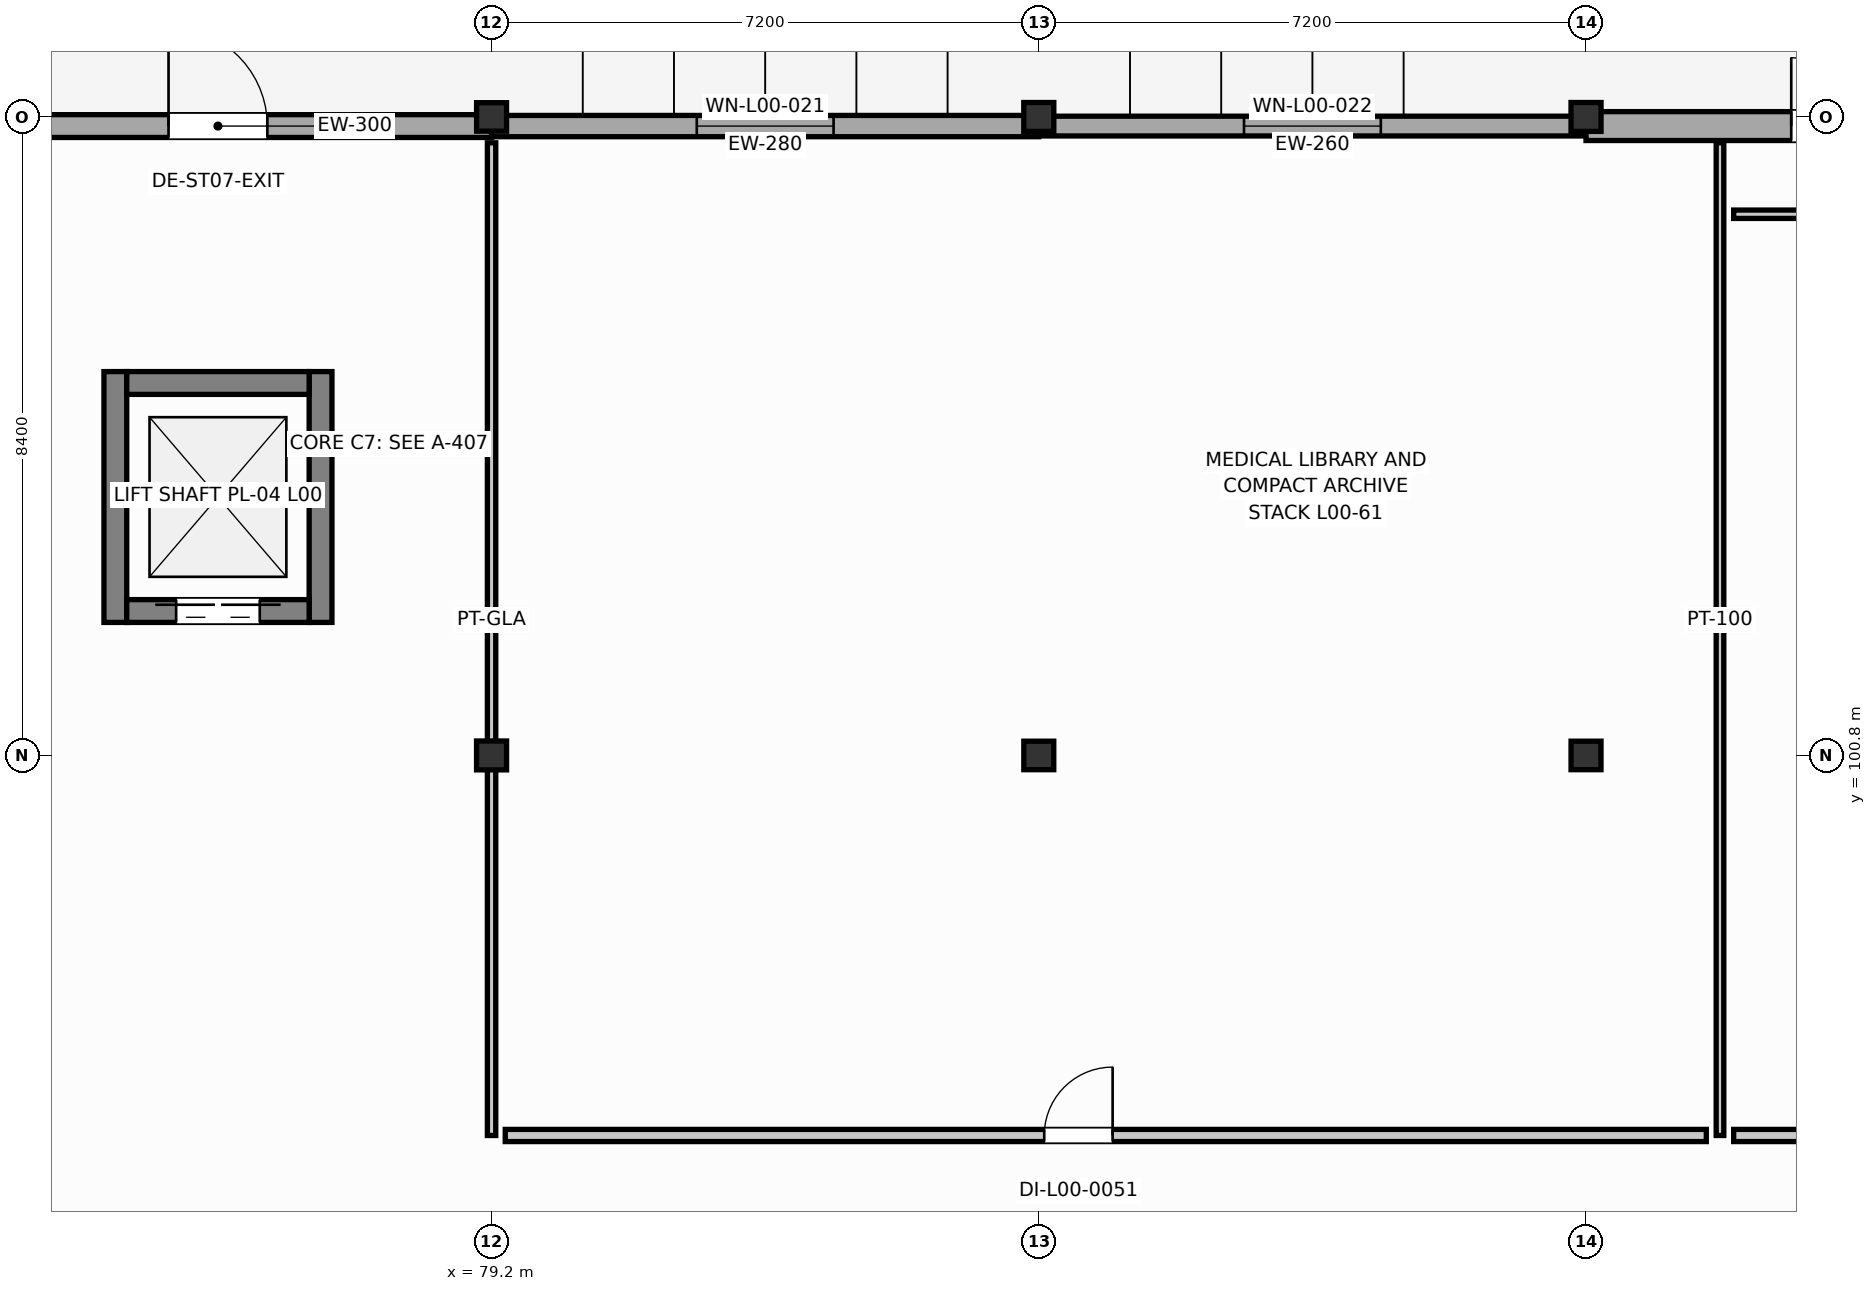
"""IFC4 building model, lengths in metres.
Left out: names, types, materials, properties, quantities, classifications, styles, units other than length and angle.
Written with IfcOpenShell. Run it as: python <this file> out.ifc"""

import sys

from ifc_helpers import new_model, si_unit, direction, frame, frame_2d, origin, origin_2d, place, context, subcontext, project, spatial, rectangle, i_section, extrude, element, fill, save


model = new_model("IFC4")
c1 = context("Model", 3, precision=1e-05, world=origin(), true_north=direction((0.0, 1.0)))
c2 = subcontext(c1, "Body", "Model", "MODEL_VIEW")
j1 = project(units=[si_unit("LENGTHUNIT", "METRE"), si_unit("PLANEANGLEUNIT", "RADIAN")], contexts=[c1])
p1 = place(None, origin())
s1 = spatial("IfcSite", under=j1, at=p1, CompositionType="ELEMENT")
p2 = place(p1, origin())
s2 = spatial("IfcBuilding", under=s1, at=p2, CompositionType="ELEMENT")
p3 = place(p2, origin())
s3 = spatial("IfcBuildingStorey", under=s2, at=p3, CompositionType="ELEMENT", Elevation=0.0)
p4 = place(p3, frame((79.2, 100.8, 0.0), z_axis=(0.0, 0.0, 1.0), x_axis=(1.0, 0.0, 0.0)))
e1 = element("IfcColumn", 1, at=p4, inside=s3, PredefinedType="COLUMN", context=c2, shape_type="SweptSolid", body=[
    extrude(i_section(OverallWidth=0.395, OverallDepth=0.38, WebThickness=0.019, FlangeThickness=0.03, FilletRadius=0.02, at=origin_2d()), origin(), (0.0, 0.0, 1.0), 4.8),
])
for number, where, z_axis, x_axis in (
    (2, (79.2, 109.2, 0.0), (0.0, 0.0, 1.0), (1.0, 0.0, 0.0)),
    (3, (86.4, 100.8, 0.0), (0.0, 0.0, 1.0), (1.0, 0.0, 0.0)),
):
    element("IfcColumn", number, at=place(p3, frame(where, z_axis=z_axis, x_axis=x_axis)), inside=s3, PredefinedType="COLUMN", context=c2, shape_type="SweptSolid", body=[
        extrude(i_section(OverallWidth=0.394, OverallDepth=0.375, WebThickness=0.017, FlangeThickness=0.028, FilletRadius=0.02, at=origin_2d()), origin(), (0.0, 0.0, 1.0), 4.8),
    ])
p5 = place(p3, frame((86.4, 109.2, 0.0), z_axis=(0.0, 0.0, 1.0), x_axis=(1.0, 0.0, 0.0)))
e4 = element("IfcColumn", 4, at=p5, inside=s3, PredefinedType="COLUMN", context=c2, shape_type="SweptSolid", body=[
    extrude(i_section(OverallWidth=0.395, OverallDepth=0.38, WebThickness=0.019, FlangeThickness=0.03, FilletRadius=0.02, at=origin_2d()), origin(), (0.0, 0.0, 1.0), 4.8),
])
p6 = place(p3, frame((93.6, 100.8, 0.0), z_axis=(0.0, 0.0, 1.0), x_axis=(1.0, 0.0, 0.0)))
e5 = element("IfcColumn", 5, at=p6, inside=s3, PredefinedType="COLUMN", context=c2, shape_type="SweptSolid", body=[
    extrude(i_section(OverallWidth=0.394, OverallDepth=0.375, WebThickness=0.017, FlangeThickness=0.028, FilletRadius=0.02, at=origin_2d()), origin(), (0.0, 0.0, 1.0), 4.8),
])
p7 = place(p3, frame((93.6, 109.2, 0.0), z_axis=(0.0, 0.0, 1.0), x_axis=(1.0, 0.0, 0.0)))
e6 = element("IfcColumn", 6, at=p7, inside=s3, PredefinedType="COLUMN", context=c2, shape_type="SweptSolid", body=[
    extrude(i_section(OverallWidth=0.395, OverallDepth=0.38, WebThickness=0.019, FlangeThickness=0.03, FilletRadius=0.02, at=origin_2d()), origin(), (0.0, 0.0, 1.0), 4.8),
])
for number, where, z_axis, x_axis in (
    (7, (74.25, 102.55, 0.0), (0.0, 0.0, 1.0), (0.0, 1.0, 0.0)),
    (8, (76.95, 102.55, 0.0), (0.0, 0.0, 1.0), (0.0, 1.0, 0.0)),
):
    element("IfcWall", number, at=place(p3, frame(where, z_axis=z_axis, x_axis=x_axis)), inside=s3, PredefinedType="SHEAR", context=c2, shape_type="SweptSolid", body=[
        extrude(rectangle(XDim=3.3, YDim=0.3, at=frame_2d((1.65, 0.0))), origin(), (0.0, 0.0, 1.0), 4.57),
    ])
p8 = place(p3, frame((74.4, 105.7, 0.0), z_axis=(0.0, 0.0, 1.0), x_axis=(1.0, 0.0, 0.0)))
e9 = element("IfcWall", 9, at=p8, inside=s3, PredefinedType="SHEAR", context=c2, shape_type="SweptSolid", body=[
    extrude(rectangle(XDim=2.4, YDim=0.3, at=frame_2d((1.2, 0.0))), origin(), (0.0, 0.0, 1.0), 4.57),
])
p9 = place(p3, frame((74.4, 102.7, 0.0), z_axis=(0.0, 0.0, 1.0), x_axis=(1.0, 0.0, 0.0)))
e10 = element("IfcWall", 10, at=p9, inside=s3, PredefinedType="SHEAR", context=c2, shape_type="SweptSolid", body=[
    extrude(rectangle(XDim=2.4, YDim=0.3, at=frame_2d((1.2, 0.0))), origin(), (0.0, 0.0, 1.0), 4.57),
])
p10 = place(p9, frame((0.65, 0.0, 0.0)))
e11 = element("IfcOpeningElement", 11, at=p10, cuts=e10, PredefinedType="OPENING", context=c2, shape_type="SweptSolid", body=[
    extrude(rectangle(XDim=1.1, YDim=2.15, at=frame_2d((0.55, 1.075))), frame((0.0, 0.16, 0.0), z_axis=(0.0, -1.0, 0.0), x_axis=(1.0, 0.0, 0.0)), (0.0, 0.0, 1.0), 0.32),
])
p11 = place(p3, frame((72.0, 109.08, 0.0), z_axis=(0.0, 0.0, 1.0), x_axis=(1.0, 0.0, 0.0)))
e12 = element("IfcWall", 12, at=p11, inside=s3, PredefinedType="SOLIDWALL", context=c2, shape_type="SweptSolid", body=[
    extrude(rectangle(XDim=7.2, YDim=0.3, at=frame_2d((3.6, 0.0))), origin(), (0.0, 0.0, 1.0), 4.082),
])
p12 = place(p11, frame((2.95, 0.0, 0.0)))
e13 = element("IfcOpeningElement", 13, at=p12, cuts=e12, PredefinedType="OPENING", context=c2, shape_type="SweptSolid", body=[
    extrude(rectangle(XDim=1.3, YDim=2.2, at=frame_2d((0.65, 1.1))), frame((0.0, 0.16, 0.0), z_axis=(0.0, -1.0, 0.0), x_axis=(1.0, 0.0, 0.0)), (0.0, 0.0, 1.0), 0.32),
])
p13 = place(p3, frame((79.2, 109.08, 0.0), z_axis=(0.0, 0.0, 1.0), x_axis=(1.0, 0.0, 0.0)))
e14 = element("IfcWall", 14, at=p13, inside=s3, PredefinedType="SOLIDWALL", context=c2, shape_type="SweptSolid", body=[
    extrude(rectangle(XDim=7.2, YDim=0.28, at=frame_2d((3.6, 0.0))), origin(), (0.0, 0.0, 1.0), 4.082),
])
p14 = place(p13, frame((2.7, 0.0, 0.95)))
e15 = element("IfcOpeningElement", 15, at=p14, cuts=e14, PredefinedType="OPENING", context=c2, shape_type="SweptSolid", body=[
    extrude(rectangle(XDim=1.8, YDim=1.15, at=frame_2d((0.9, 0.575))), frame((0.0, 0.15, 0.0), z_axis=(0.0, -1.0, 0.0), x_axis=(1.0, 0.0, 0.0)), (0.0, 0.0, 1.0), 0.3),
])
p15 = place(p3, frame((86.4, 109.08, 0.0), z_axis=(0.0, 0.0, 1.0), x_axis=(1.0, 0.0, 0.0)))
e16 = element("IfcWall", 16, at=p15, inside=s3, PredefinedType="SOLIDWALL", context=c2, shape_type="SweptSolid", body=[
    extrude(rectangle(XDim=7.2, YDim=0.26, at=frame_2d((3.6, 0.0))), origin(), (0.0, 0.0, 1.0), 4.082),
])
p16 = place(p15, frame((2.7, 0.0, 0.95)))
e17 = element("IfcOpeningElement", 17, at=p16, cuts=e16, PredefinedType="OPENING", context=c2, shape_type="SweptSolid", body=[
    extrude(rectangle(XDim=1.8, YDim=1.35, at=frame_2d((0.9, 0.675))), frame((0.0, 0.14, 0.0), z_axis=(0.0, -1.0, 0.0), x_axis=(1.0, 0.0, 0.0)), (0.0, 0.0, 1.0), 0.28),
])
p17 = place(p3, frame((93.6, 109.08, 0.0), z_axis=(0.0, 0.0, 1.0), x_axis=(1.0, 0.0, 0.0)))
e18 = element("IfcWall", 18, at=p17, inside=s3, PredefinedType="SOLIDWALL", context=c2, shape_type="SweptSolid", body=[
    extrude(rectangle(XDim=7.2, YDim=0.38, at=frame_2d((3.6, 0.0))), origin(), (0.0, 0.0, 1.0), 4.082),
])
p18 = place(p17, frame((2.7, 0.0, 0.0)))
e19 = element("IfcOpeningElement", 19, at=p18, cuts=e18, PredefinedType="OPENING", context=c2, shape_type="SweptSolid", body=[
    extrude(rectangle(XDim=1.8, YDim=2.2, at=frame_2d((0.9, 1.1))), frame((0.0, 0.2, 0.0), z_axis=(0.0, -1.0, 0.0), x_axis=(1.0, 0.0, 0.0)), (0.0, 0.0, 1.0), 0.4),
])
p19 = place(p3, frame((79.2, 95.8, 0.0), z_axis=(0.0, 0.0, 1.0), x_axis=(0.0, 1.0, 0.0)))
e20 = element("IfcWall", 20, at=p19, inside=s3, PredefinedType="MOVABLE", context=c2, shape_type="SweptSolid", body=[
    extrude(rectangle(XDim=13.06, YDim=0.11, at=frame_2d((6.53, 0.0))), origin(), (0.0, 0.0, 1.0), 3.694),
])
p20 = place(p3, frame((95.363, 108.86, 0.0), z_axis=(0.0, 0.0, 1.0), x_axis=(0.0, -1.0, 0.0)))
e21 = element("IfcWall", 21, at=p20, inside=s3, PredefinedType="PARTITIONING", context=c2, shape_type="SweptSolid", body=[
    extrude(rectangle(XDim=13.06, YDim=0.1, at=frame_2d((6.53, 0.0))), origin(), (0.0, 0.0, 1.0), 4.132),
])
p21 = place(p3, frame((95.183, 95.8, 0.0), z_axis=(0.0, 0.0, 1.0), x_axis=(-1.0, 0.0, 0.0)))
e22 = element("IfcWall", 22, at=p21, inside=s3, PredefinedType="PARTITIONING", context=c2, shape_type="SweptSolid", body=[
    extrude(rectangle(XDim=15.803, YDim=0.16, at=frame_2d((7.901, 0.0))), origin(), (0.0, 0.0, 1.0), 4.008),
])
p22 = place(p21, frame((7.811, 0.0, 0.0)))
e23 = element("IfcOpeningElement", 23, at=p22, cuts=e22, PredefinedType="OPENING", context=c2, shape_type="SweptSolid", body=[
    extrude(rectangle(XDim=0.9, YDim=2.04, at=frame_2d((0.45, 1.02))), frame((0.0, 0.09, 0.0), z_axis=(0.0, -1.0, 0.0), x_axis=(1.0, 0.0, 0.0)), (0.0, 0.0, 1.0), 0.18),
])
p23 = place(p3, frame((111.345, 95.8, 0.0), z_axis=(0.0, 0.0, 1.0), x_axis=(-1.0, 0.0, 0.0)))
e24 = element("IfcWall", 24, at=p23, inside=s3, PredefinedType="PARTITIONING", context=c2, shape_type="SweptSolid", body=[
    extrude(rectangle(XDim=15.802, YDim=0.16, at=frame_2d((7.901, 0.0))), origin(), (0.0, 0.0, 1.0), 3.775),
])
p24 = place(p23, frame((7.276, 0.0, 0.0)))
e25 = element("IfcOpeningElement", 25, at=p24, cuts=e24, PredefinedType="OPENING", context=c2, shape_type="SweptSolid", body=[
    extrude(rectangle(XDim=1.65, YDim=2.2, at=frame_2d((0.825, 1.1))), frame((0.0, 0.09, 0.0), z_axis=(0.0, -1.0, 0.0), x_axis=(1.0, 0.0, 0.0)), (0.0, 0.0, 1.0), 0.18),
])
p25 = place(p3, frame((95.542, 107.92, 0.0), z_axis=(0.0, 0.0, 1.0), x_axis=(1.0, 0.0, 0.0)))
e26 = element("IfcWall", 26, at=p25, inside=s3, PredefinedType="MOVABLE", context=c2, shape_type="SweptSolid", body=[
    extrude(rectangle(XDim=2.637, YDim=0.11, at=frame_2d((1.319, 0.0))), origin(), (0.0, 0.0, 1.0), 4.198),
])
p26 = place(p10, origin())
e27 = element("IfcDoor", 27, at=p26, inside=s3, OperationType="DOUBLE_DOOR_SLIDING", PredefinedType="DOOR", context=c2, shape_type="SweptSolid", body=[
    extrude(rectangle(XDim=1.1, YDim=2.15, at=frame_2d((0.55, 1.075))), frame((0.0, 0.025, 0.0), z_axis=(0.0, -1.0, 0.0), x_axis=(1.0, 0.0, 0.0)), (0.0, 0.0, 1.0), 0.05),
])
fill(e11, e27)
p27 = place(p12, origin())
e28 = element("IfcDoor", 28, at=p27, inside=s3, OperationType="SINGLE_SWING_LEFT", PredefinedType="DOOR", context=c2, shape_type="SweptSolid", body=[
    extrude(rectangle(XDim=1.3, YDim=2.2, at=frame_2d((0.65, 1.1))), frame((0.0, 0.025, 0.0), z_axis=(0.0, -1.0, 0.0), x_axis=(1.0, 0.0, 0.0)), (0.0, 0.0, 1.0), 0.05),
])
fill(e13, e28)
p28 = place(p14, origin())
e29 = element("IfcWindow", 29, at=p28, inside=s3, PartitioningType="SINGLE_PANEL", PredefinedType="WINDOW", context=c2, shape_type="SweptSolid", body=[
    extrude(rectangle(XDim=1.8, YDim=1.15, at=frame_2d((0.9, 0.575))), frame((0.0, 0.03, 0.0), z_axis=(0.0, -1.0, 0.0), x_axis=(1.0, 0.0, 0.0)), (0.0, 0.0, 1.0), 0.06),
])
fill(e15, e29)
p29 = place(p16, origin())
e30 = element("IfcWindow", 30, at=p29, inside=s3, PartitioningType="SINGLE_PANEL", PredefinedType="WINDOW", context=c2, shape_type="SweptSolid", body=[
    extrude(rectangle(XDim=1.8, YDim=1.35, at=frame_2d((0.9, 0.675))), frame((0.0, 0.03, 0.0), z_axis=(0.0, -1.0, 0.0), x_axis=(1.0, 0.0, 0.0)), (0.0, 0.0, 1.0), 0.06),
])
fill(e17, e30)
p30 = place(p18, origin())
e31 = element("IfcDoor", 31, at=p30, inside=s3, OperationType="DOUBLE_DOOR_SINGLE_SWING", PredefinedType="DOOR", context=c2, shape_type="SweptSolid", body=[
    extrude(rectangle(XDim=1.8, YDim=2.2, at=frame_2d((0.9, 1.1))), frame((0.0, 0.025, 0.0), z_axis=(0.0, -1.0, 0.0), x_axis=(1.0, 0.0, 0.0)), (0.0, 0.0, 1.0), 0.05),
])
fill(e19, e31)
p31 = place(p22, frame((0.9, 0.0, 0.0), z_axis=(0.0, 0.0, 1.0), x_axis=(-1.0, 0.0, 0.0)))
e32 = element("IfcDoor", 32, at=p31, inside=s3, OperationType="SINGLE_SWING_RIGHT", PredefinedType="DOOR", context=c2, shape_type="SweptSolid", body=[
    extrude(rectangle(XDim=0.9, YDim=2.04, at=frame_2d((0.45, 1.02))), frame((0.0, 0.025, 0.0), z_axis=(0.0, -1.0, 0.0), x_axis=(1.0, 0.0, 0.0)), (0.0, 0.0, 1.0), 0.05),
])
fill(e23, e32)
save(model, sys.argv[1])
